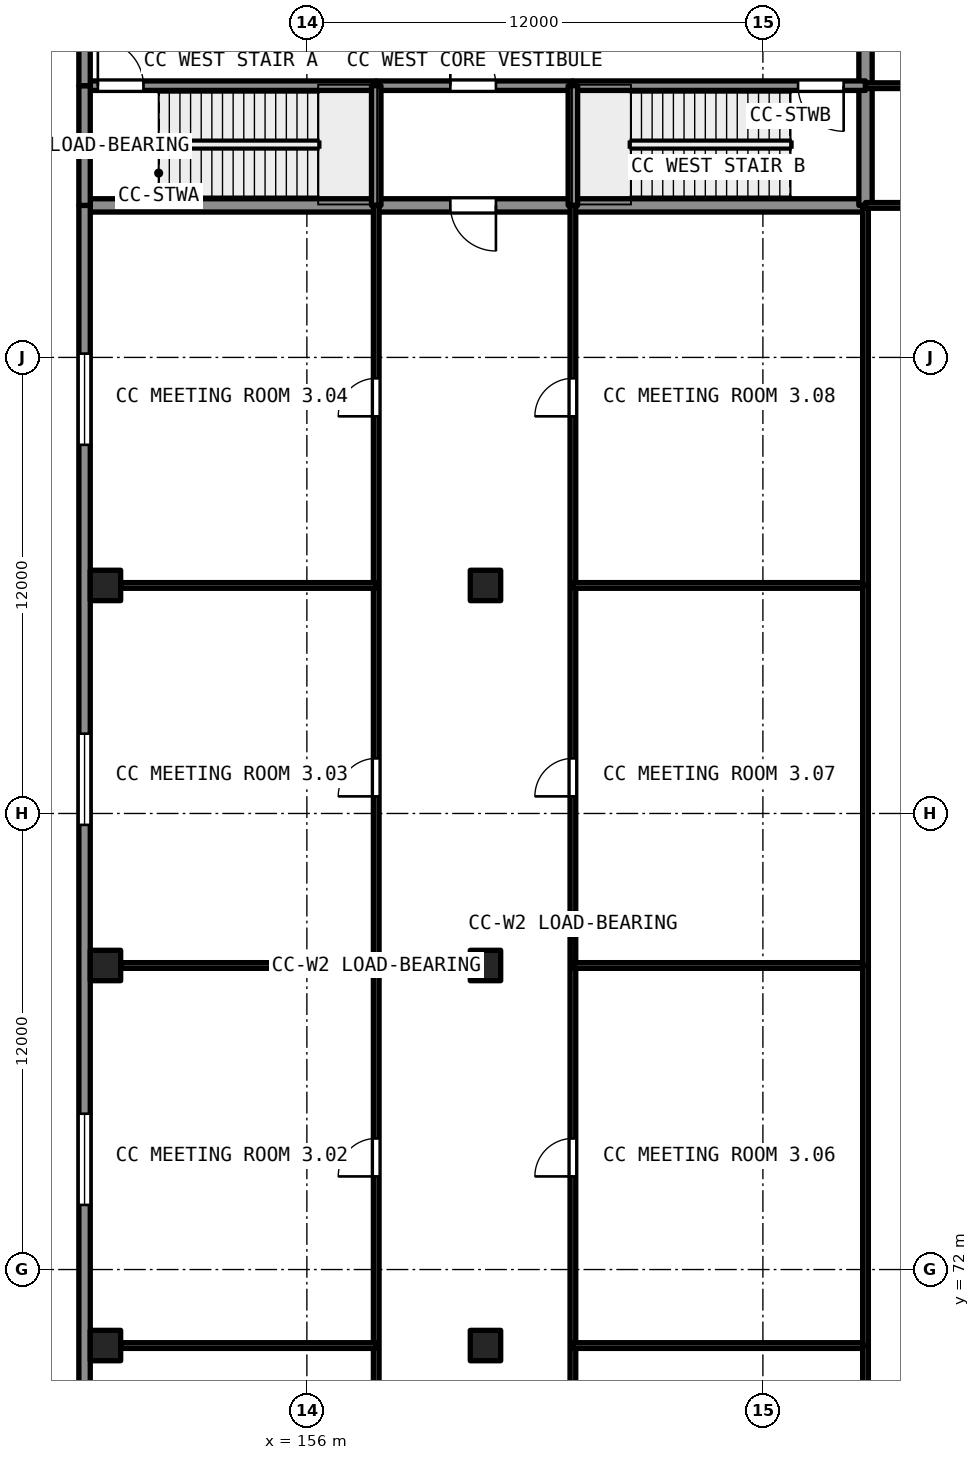
"""IFC4 building model, lengths in metres.
Left out: names, types, materials, properties, quantities, classifications, styles, units other than length and angle.
Written with IfcOpenShell. Run it as: python <this file> out.ifc"""

import sys

from ifc_helpers import new_model, si_unit, direction, frame, frame_2d, origin, origin_2d, place, context, subcontext, project, spatial, rectangle, extrude, element, fill, save


model = new_model("IFC4")
c1 = context("Model", 3, precision=1e-05, world=origin(), true_north=direction((0.0, 1.0)))
c2 = subcontext(c1, "Body", "Model", "MODEL_VIEW")
j1 = project(units=[si_unit("LENGTHUNIT", "METRE"), si_unit("PLANEANGLEUNIT", "RADIAN")], contexts=[c1])
p1 = place(None, origin())
s1 = spatial("IfcSite", under=j1, at=p1, CompositionType="ELEMENT")
p2 = place(p1, origin())
s2 = spatial("IfcBuilding", under=s1, at=p2, CompositionType="ELEMENT")
p3 = place(p2, frame((0.0, 0.0, 20.4)))
s3 = spatial("IfcBuildingStorey", under=s2, at=p3, CompositionType="ELEMENT", Elevation=20.4)
for number, where, z_axis, x_axis in (
    (1, (150.7, 70.0, 0.0), (0.0, 0.0, 1.0), (1.0, 0.0, 0.0)),
    (2, (150.7, 80.0, 0.0), (0.0, 0.0, 1.0), (1.0, 0.0, 0.0)),
    (3, (150.7, 90.0, 0.0), (0.0, 0.0, 1.0), (1.0, 0.0, 0.0)),
    (4, (160.7, 70.0, 0.0), (0.0, 0.0, 1.0), (1.0, 0.0, 0.0)),
    (5, (160.7, 80.0, 0.0), (0.0, 0.0, 1.0), (1.0, 0.0, 0.0)),
    (6, (160.7, 90.0, 0.0), (0.0, 0.0, 1.0), (1.0, 0.0, 0.0)),
):
    element("IfcColumn", number, at=place(p3, frame(where, z_axis=z_axis, x_axis=x_axis)), inside=s3, PredefinedType="COLUMN", context=c2, shape_type="SweptSolid", body=[
        extrude(rectangle(XDim=0.8, YDim=0.8, at=origin_2d()), origin(), (0.0, 0.0, 1.0), 4.59),
    ])
p4 = place(p3, frame((150.3, 100.0, 0.0), z_axis=(0.0, 0.0, 1.0), x_axis=(1.0, 0.0, 0.0)))
e7 = element("IfcWall", 7, at=p4, inside=s3, PredefinedType="SHEAR", context=c2, shape_type="SweptSolid", body=[
    extrude(rectangle(XDim=7.525, YDim=0.35, at=frame_2d((3.762, 0.0))), origin(), (0.0, 0.0, 1.0), 4.59),
])
p5 = place(p3, frame((163.0, 100.0, 0.0), z_axis=(0.0, 0.0, 1.0), x_axis=(-1.0, 0.0, 0.0)))
e8 = element("IfcWall", 8, at=p5, inside=s3, PredefinedType="SHEAR", context=c2, shape_type="SweptSolid", body=[
    extrude(rectangle(XDim=5.175, YDim=0.35, at=frame_2d((2.587, 0.0))), origin(), (0.0, 0.0, 1.0), 4.59),
])
p6 = place(p5, frame((2.025, 0.0, 0.0)))
e9 = element("IfcOpeningElement", 9, at=p6, cuts=e8, PredefinedType="OPENING", context=c2, shape_type="SweptSolid", body=[
    extrude(rectangle(XDim=1.2, YDim=2.1, at=frame_2d((0.6, 1.05))), frame((0.0, 0.186, 0.0), z_axis=(0.0, -1.0, 0.0), x_axis=(1.0, 0.0, 0.0)), (0.0, 0.0, 1.0), 0.371),
])
p7 = place(p3, frame((163.0, 100.0, 0.0), z_axis=(0.0, 0.0, 1.0), x_axis=(1.0, 0.0, 0.0)))
e10 = element("IfcWall", 10, at=p7, inside=s3, PredefinedType="SHEAR", context=c2, shape_type="SweptSolid", body=[
    extrude(rectangle(XDim=7.7, YDim=0.35, at=frame_2d((3.85, 0.0))), origin(), (0.0, 0.0, 1.0), 4.59),
])
p8 = place(p3, frame((170.7, 100.0, 0.0), z_axis=(0.0, 0.0, 1.0), x_axis=(0.0, 1.0, 0.0)))
e11 = element("IfcWall", 11, at=p8, inside=s3, PredefinedType="SHEAR", context=c2, shape_type="SweptSolid", body=[
    extrude(rectangle(XDim=3.15, YDim=0.35, at=frame_2d((1.575, 0.0))), origin(), (0.0, 0.0, 1.0), 4.59),
])
p9 = place(p3, frame((170.7, 103.15, 0.0), z_axis=(0.0, 0.0, 1.0), x_axis=(0.0, 1.0, 0.0)))
e12 = element("IfcWall", 12, at=p9, inside=s3, PredefinedType="SHEAR", context=c2, shape_type="SweptSolid", body=[
    extrude(rectangle(XDim=7.25, YDim=0.35, at=frame_2d((3.625, 0.0))), origin(), (0.0, 0.0, 1.0), 4.59),
])
p10 = place(p9, frame((1.2, 0.0, 0.0)))
e13 = element("IfcOpeningElement", 13, at=p10, cuts=e12, PredefinedType="OPENING", context=c2, shape_type="SweptSolid", body=[
    extrude(rectangle(XDim=1.8, YDim=2.1, at=frame_2d((0.9, 1.05))), frame((0.0, 0.186, 0.0), z_axis=(0.0, -1.0, 0.0), x_axis=(1.0, 0.0, 0.0)), (0.0, 0.0, 1.0), 0.371),
])
p11 = place(p3, frame((150.3, 103.15, 0.0), z_axis=(0.0, 0.0, 1.0), x_axis=(1.0, 0.0, 0.0)))
e14 = element("IfcWall", 14, at=p11, inside=s3, PredefinedType="SHEAR", context=c2, shape_type="SweptSolid", body=[
    extrude(rectangle(XDim=7.525, YDim=0.25, at=frame_2d((3.762, 0.0))), origin(), (0.0, 0.0, 1.0), 4.59),
])
p12 = place(p11, frame((0.2, 0.0, 0.0)))
e15 = element("IfcOpeningElement", 15, at=p12, cuts=e14, PredefinedType="OPENING", context=c2, shape_type="SweptSolid", body=[
    extrude(rectangle(XDim=1.2, YDim=2.1, at=frame_2d((0.6, 1.05))), frame((0.0, 0.135, 0.0), z_axis=(0.0, -1.0, 0.0), x_axis=(1.0, 0.0, 0.0)), (0.0, 0.0, 1.0), 0.271),
])
p13 = place(p3, frame((157.825, 103.15, 0.0), z_axis=(0.0, 0.0, 1.0), x_axis=(1.0, 0.0, 0.0)))
e16 = element("IfcWall", 16, at=p13, inside=s3, PredefinedType="SHEAR", context=c2, shape_type="SweptSolid", body=[
    extrude(rectangle(XDim=5.175, YDim=0.25, at=frame_2d((2.587, 0.0))), origin(), (0.0, 0.0, 1.0), 4.59),
])
p14 = place(p13, frame((1.95, 0.0, 0.0)))
e17 = element("IfcOpeningElement", 17, at=p14, cuts=e16, PredefinedType="OPENING", context=c2, shape_type="SweptSolid", body=[
    extrude(rectangle(XDim=1.2, YDim=2.1, at=frame_2d((0.6, 1.05))), frame((0.0, 0.135, 0.0), z_axis=(0.0, -1.0, 0.0), x_axis=(1.0, 0.0, 0.0)), (0.0, 0.0, 1.0), 0.271),
])
p15 = place(p3, frame((163.0, 103.15, 0.0), z_axis=(0.0, 0.0, 1.0), x_axis=(1.0, 0.0, 0.0)))
e18 = element("IfcWall", 18, at=p15, inside=s3, PredefinedType="SHEAR", context=c2, shape_type="SweptSolid", body=[
    extrude(rectangle(XDim=7.7, YDim=0.25, at=frame_2d((3.85, 0.0))), origin(), (0.0, 0.0, 1.0), 4.59),
])
p16 = place(p15, frame((5.925, 0.0, 0.0)))
e19 = element("IfcOpeningElement", 19, at=p16, cuts=e18, PredefinedType="OPENING", context=c2, shape_type="SweptSolid", body=[
    extrude(rectangle(XDim=1.2, YDim=2.1, at=frame_2d((0.6, 1.05))), frame((0.0, 0.135, 0.0), z_axis=(0.0, -1.0, 0.0), x_axis=(1.0, 0.0, 0.0)), (0.0, 0.0, 1.0), 0.271),
])
for number, where, z_axis, x_axis in (
    (20, (157.825, 100.0, 0.0), (0.0, 0.0, 1.0), (0.0, 1.0, 0.0)),
    (21, (163.0, 100.0, 0.0), (0.0, 0.0, 1.0), (0.0, 1.0, 0.0)),
):
    element("IfcWall", number, at=place(p3, frame(where, z_axis=z_axis, x_axis=x_axis)), inside=s3, PredefinedType="SHEAR", context=c2, shape_type="SweptSolid", body=[
        extrude(rectangle(XDim=3.15, YDim=0.25, at=frame_2d((1.575, 0.0))), origin(), (0.0, 0.0, 1.0), 4.59),
    ])
p17 = place(p3, frame((150.15, 49.45, 0.0), z_axis=(0.0, 0.0, 1.0), x_axis=(0.0, 1.0, 0.0)))
e22 = element("IfcWall", 22, at=p17, inside=s3, PredefinedType="SOLIDWALL", context=c2, shape_type="SweptSolid", body=[
    extrude(rectangle(XDim=50.55, YDim=0.3, at=frame_2d((25.275, 0.0))), origin(), (0.0, 0.0, 1.0), 4.59),
])
p18 = place(p17, frame((14.25, 0.0, 0.9)))
e23 = element("IfcOpeningElement", 23, at=p18, cuts=e22, PredefinedType="OPENING", context=c2, shape_type="SweptSolid", body=[
    extrude(rectangle(XDim=2.4, YDim=1.8, at=frame_2d((1.2, 0.9))), frame((0.0, 0.161, 0.0), z_axis=(0.0, -1.0, 0.0), x_axis=(1.0, 0.0, 0.0)), (0.0, 0.0, 1.0), 0.321),
])
p19 = place(p17, frame((24.25, 0.0, 0.9)))
e24 = element("IfcOpeningElement", 24, at=p19, cuts=e22, PredefinedType="OPENING", context=c2, shape_type="SweptSolid", body=[
    extrude(rectangle(XDim=2.4, YDim=1.8, at=frame_2d((1.2, 0.9))), frame((0.0, 0.161, 0.0), z_axis=(0.0, -1.0, 0.0), x_axis=(1.0, 0.0, 0.0)), (0.0, 0.0, 1.0), 0.321),
])
p20 = place(p17, frame((34.25, 0.0, 0.9)))
e25 = element("IfcOpeningElement", 25, at=p20, cuts=e22, PredefinedType="OPENING", context=c2, shape_type="SweptSolid", body=[
    extrude(rectangle(XDim=2.4, YDim=1.8, at=frame_2d((1.2, 0.9))), frame((0.0, 0.161, 0.0), z_axis=(0.0, -1.0, 0.0), x_axis=(1.0, 0.0, 0.0)), (0.0, 0.0, 1.0), 0.321),
])
p21 = place(p17, frame((44.25, 0.0, 0.9)))
e26 = element("IfcOpeningElement", 26, at=p21, cuts=e22, PredefinedType="OPENING", context=c2, shape_type="SweptSolid", body=[
    extrude(rectangle(XDim=2.4, YDim=1.8, at=frame_2d((1.2, 0.9))), frame((0.0, 0.161, 0.0), z_axis=(0.0, -1.0, 0.0), x_axis=(1.0, 0.0, 0.0)), (0.0, 0.0, 1.0), 0.321),
])
p22 = place(p3, frame((150.15, 100.0, 0.0), z_axis=(0.0, 0.0, 1.0), x_axis=(0.0, 1.0, 0.0)))
e27 = element("IfcWall", 27, at=p22, inside=s3, PredefinedType="SOLIDWALL", context=c2, shape_type="SweptSolid", body=[
    extrude(rectangle(XDim=3.15, YDim=0.3, at=frame_2d((1.575, 0.0))), origin(), (0.0, 0.0, 1.0), 4.59),
])
p23 = place(p3, frame((150.15, 103.15, 0.0), z_axis=(0.0, 0.0, 1.0), x_axis=(0.0, 1.0, 0.0)))
e28 = element("IfcWall", 28, at=p23, inside=s3, PredefinedType="SOLIDWALL", context=c2, shape_type="SweptSolid", body=[
    extrude(rectangle(XDim=4.225, YDim=0.3, at=frame_2d((2.113, 0.0))), origin(), (0.0, 0.0, 1.0), 4.59),
])
p24 = place(p3, frame((157.825, 100.0, 0.0), z_axis=(0.0, 0.0, 1.0), x_axis=(0.0, -1.0, 0.0)))
e29 = element("IfcWall", 29, at=p24, inside=s3, PredefinedType="PARTITIONING", context=c2, shape_type="SweptSolid", body=[
    extrude(rectangle(XDim=40.0, YDim=0.15, at=frame_2d((20.0, 0.0))), origin(), (0.0, 0.0, 1.0), 4.59),
])
p25 = place(p24, frame((34.55, 0.0, 0.0)))
e30 = element("IfcOpeningElement", 30, at=p25, cuts=e29, PredefinedType="OPENING", context=c2, shape_type="SweptSolid", body=[
    extrude(rectangle(XDim=1.0, YDim=2.1, at=frame_2d((0.5, 1.05))), frame((0.0, 0.085, 0.0), z_axis=(0.0, -1.0, 0.0), x_axis=(1.0, 0.0, 0.0)), (0.0, 0.0, 1.0), 0.171),
])
p26 = place(p24, frame((24.55, 0.0, 0.0)))
e31 = element("IfcOpeningElement", 31, at=p26, cuts=e29, PredefinedType="OPENING", context=c2, shape_type="SweptSolid", body=[
    extrude(rectangle(XDim=1.0, YDim=2.1, at=frame_2d((0.5, 1.05))), frame((0.0, 0.085, 0.0), z_axis=(0.0, -1.0, 0.0), x_axis=(1.0, 0.0, 0.0)), (0.0, 0.0, 1.0), 0.171),
])
p27 = place(p24, frame((14.55, 0.0, 0.0)))
e32 = element("IfcOpeningElement", 32, at=p27, cuts=e29, PredefinedType="OPENING", context=c2, shape_type="SweptSolid", body=[
    extrude(rectangle(XDim=1.0, YDim=2.1, at=frame_2d((0.5, 1.05))), frame((0.0, 0.085, 0.0), z_axis=(0.0, -1.0, 0.0), x_axis=(1.0, 0.0, 0.0)), (0.0, 0.0, 1.0), 0.171),
])
p28 = place(p24, frame((4.55, 0.0, 0.0)))
e33 = element("IfcOpeningElement", 33, at=p28, cuts=e29, PredefinedType="OPENING", context=c2, shape_type="SweptSolid", body=[
    extrude(rectangle(XDim=1.0, YDim=2.1, at=frame_2d((0.5, 1.05))), frame((0.0, 0.085, 0.0), z_axis=(0.0, -1.0, 0.0), x_axis=(1.0, 0.0, 0.0)), (0.0, 0.0, 1.0), 0.171),
])
p29 = place(p3, frame((163.0, 60.0, 0.0), z_axis=(0.0, 0.0, 1.0), x_axis=(0.0, 1.0, 0.0)))
e34 = element("IfcWall", 34, at=p29, inside=s3, PredefinedType="PARTITIONING", context=c2, shape_type="SweptSolid", body=[
    extrude(rectangle(XDim=40.0, YDim=0.15, at=frame_2d((20.0, 0.0))), origin(), (0.0, 0.0, 1.0), 4.59),
])
p30 = place(p29, frame((4.45, 0.0, 0.0)))
e35 = element("IfcOpeningElement", 35, at=p30, cuts=e34, PredefinedType="OPENING", context=c2, shape_type="SweptSolid", body=[
    extrude(rectangle(XDim=1.0, YDim=2.1, at=frame_2d((0.5, 1.05))), frame((0.0, 0.085, 0.0), z_axis=(0.0, -1.0, 0.0), x_axis=(1.0, 0.0, 0.0)), (0.0, 0.0, 1.0), 0.171),
])
p31 = place(p29, frame((14.45, 0.0, 0.0)))
e36 = element("IfcOpeningElement", 36, at=p31, cuts=e34, PredefinedType="OPENING", context=c2, shape_type="SweptSolid", body=[
    extrude(rectangle(XDim=1.0, YDim=2.1, at=frame_2d((0.5, 1.05))), frame((0.0, 0.085, 0.0), z_axis=(0.0, -1.0, 0.0), x_axis=(1.0, 0.0, 0.0)), (0.0, 0.0, 1.0), 0.171),
])
p32 = place(p29, frame((24.45, 0.0, 0.0)))
e37 = element("IfcOpeningElement", 37, at=p32, cuts=e34, PredefinedType="OPENING", context=c2, shape_type="SweptSolid", body=[
    extrude(rectangle(XDim=1.0, YDim=2.1, at=frame_2d((0.5, 1.05))), frame((0.0, 0.085, 0.0), z_axis=(0.0, -1.0, 0.0), x_axis=(1.0, 0.0, 0.0)), (0.0, 0.0, 1.0), 0.171),
])
p33 = place(p29, frame((34.45, 0.0, 0.0)))
e38 = element("IfcOpeningElement", 38, at=p33, cuts=e34, PredefinedType="OPENING", context=c2, shape_type="SweptSolid", body=[
    extrude(rectangle(XDim=1.0, YDim=2.1, at=frame_2d((0.5, 1.05))), frame((0.0, 0.085, 0.0), z_axis=(0.0, -1.0, 0.0), x_axis=(1.0, 0.0, 0.0)), (0.0, 0.0, 1.0), 0.171),
])
p34 = place(p3, frame((151.1, 70.0, 0.0), z_axis=(0.0, 0.0, 1.0), x_axis=(1.0, 0.0, 0.0)))
e39 = element("IfcWall", 39, at=p34, inside=s3, PredefinedType="PARTITIONING", context=c2, shape_type="SweptSolid", body=[
    extrude(rectangle(XDim=6.725, YDim=0.15, at=frame_2d((3.362, 0.0))), origin(), (0.0, 0.0, 1.0), 4.59),
])
p35 = place(p3, frame((163.0, 70.0, 0.0), z_axis=(0.0, 0.0, 1.0), x_axis=(1.0, 0.0, 0.0)))
e40 = element("IfcWall", 40, at=p35, inside=s3, PredefinedType="PARTITIONING", context=c2, shape_type="SweptSolid", body=[
    extrude(rectangle(XDim=7.7, YDim=0.15, at=frame_2d((3.85, 0.0))), origin(), (0.0, 0.0, 1.0), 4.59),
])
p36 = place(p3, frame((170.7, 60.4, 0.0), z_axis=(0.0, 0.0, 1.0), x_axis=(0.0, 1.0, 0.0)))
e41 = element("IfcWall", 41, at=p36, inside=s3, PredefinedType="PARTITIONING", context=c2, shape_type="SweptSolid", body=[
    extrude(rectangle(XDim=9.6, YDim=0.15, at=frame_2d((4.8, 0.0))), origin(), (0.0, 0.0, 1.0), 4.59),
])
p37 = place(p3, frame((151.1, 80.0, 0.0), z_axis=(0.0, 0.0, 1.0), x_axis=(1.0, 0.0, 0.0)))
e42 = element("IfcWall", 42, at=p37, inside=s3, PredefinedType="PARTITIONING", context=c2, shape_type="SweptSolid", body=[
    extrude(rectangle(XDim=6.725, YDim=0.15, at=frame_2d((3.362, 0.0))), origin(), (0.0, 0.0, 1.0), 4.59),
])
p38 = place(p3, frame((163.0, 80.0, 0.0), z_axis=(0.0, 0.0, 1.0), x_axis=(1.0, 0.0, 0.0)))
e43 = element("IfcWall", 43, at=p38, inside=s3, PredefinedType="PARTITIONING", context=c2, shape_type="SweptSolid", body=[
    extrude(rectangle(XDim=7.7, YDim=0.15, at=frame_2d((3.85, 0.0))), origin(), (0.0, 0.0, 1.0), 4.59),
])
p39 = place(p3, frame((170.7, 70.0, 0.0), z_axis=(0.0, 0.0, 1.0), x_axis=(0.0, 1.0, 0.0)))
e44 = element("IfcWall", 44, at=p39, inside=s3, PredefinedType="PARTITIONING", context=c2, shape_type="SweptSolid", body=[
    extrude(rectangle(XDim=10.0, YDim=0.15, at=frame_2d((5.0, 0.0))), origin(), (0.0, 0.0, 1.0), 4.59),
])
p40 = place(p3, frame((151.1, 90.0, 0.0), z_axis=(0.0, 0.0, 1.0), x_axis=(1.0, 0.0, 0.0)))
e45 = element("IfcWall", 45, at=p40, inside=s3, PredefinedType="PARTITIONING", context=c2, shape_type="SweptSolid", body=[
    extrude(rectangle(XDim=6.725, YDim=0.15, at=frame_2d((3.362, 0.0))), origin(), (0.0, 0.0, 1.0), 4.59),
])
p41 = place(p3, frame((163.0, 90.0, 0.0), z_axis=(0.0, 0.0, 1.0), x_axis=(1.0, 0.0, 0.0)))
e46 = element("IfcWall", 46, at=p41, inside=s3, PredefinedType="PARTITIONING", context=c2, shape_type="SweptSolid", body=[
    extrude(rectangle(XDim=7.7, YDim=0.15, at=frame_2d((3.85, 0.0))), origin(), (0.0, 0.0, 1.0), 4.59),
])
for number, where, z_axis, x_axis in (
    (47, (170.7, 80.0, 0.0), (0.0, 0.0, 1.0), (0.0, 1.0, 0.0)),
    (48, (170.7, 90.0, 0.0), (0.0, 0.0, 1.0), (0.0, 1.0, 0.0)),
):
    element("IfcWall", number, at=place(p3, frame(where, z_axis=z_axis, x_axis=x_axis)), inside=s3, PredefinedType="PARTITIONING", context=c2, shape_type="SweptSolid", body=[
        extrude(rectangle(XDim=10.0, YDim=0.15, at=frame_2d((5.0, 0.0))), origin(), (0.0, 0.0, 1.0), 4.59),
    ])
p42 = place(p3, frame((170.7, 100.0, 0.0), z_axis=(0.0, 0.0, 1.0), x_axis=(1.0, 0.0, 0.0)))
e49 = element("IfcWall", 49, at=p42, inside=s3, PredefinedType="PARTITIONING", context=c2, shape_type="SweptSolid", body=[
    extrude(rectangle(XDim=9.6, YDim=0.15, at=frame_2d((4.8, 0.0))), origin(), (0.0, 0.0, 1.0), 4.59),
])
p43 = place(p3, frame((170.7, 103.15, 0.0), z_axis=(0.0, 0.0, 1.0), x_axis=(1.0, 0.0, 0.0)))
e50 = element("IfcWall", 50, at=p43, inside=s3, PredefinedType="PARTITIONING", context=c2, shape_type="SweptSolid", body=[
    extrude(rectangle(XDim=10.85, YDim=0.15, at=frame_2d((5.425, 0.0))), origin(), (0.0, 0.0, 1.0), 4.59),
])
p44 = place(p43, frame((4.95, 0.0, 0.0)))
e51 = element("IfcOpeningElement", 51, at=p44, cuts=e50, PredefinedType="OPENING", context=c2, shape_type="SweptSolid", body=[
    extrude(rectangle(XDim=1.0, YDim=2.1, at=frame_2d((0.5, 1.05))), frame((0.0, 0.085, 0.0), z_axis=(0.0, -1.0, 0.0), x_axis=(1.0, 0.0, 0.0)), (0.0, 0.0, 1.0), 0.171),
])
p45 = place(p6, origin())
e52 = element("IfcDoor", 52, at=p45, inside=s3, OperationType="SINGLE_SWING_LEFT", PredefinedType="DOOR", context=c2, shape_type="SweptSolid", body=[
    extrude(rectangle(XDim=1.2, YDim=2.1, at=frame_2d((0.6, 1.05))), frame((0.0, 0.025, 0.0), z_axis=(0.0, -1.0, 0.0), x_axis=(1.0, 0.0, 0.0)), (0.0, 0.0, 1.0), 0.05),
])
fill(e9, e52)
p46 = place(p26, origin())
e53 = element("IfcDoor", 53, at=p46, inside=s3, OperationType="SINGLE_SWING_RIGHT", PredefinedType="DOOR", context=c2, shape_type="SweptSolid", body=[
    extrude(rectangle(XDim=1.0, YDim=2.1, at=frame_2d((0.5, 1.05))), frame((0.0, 0.025, 0.0), z_axis=(0.0, -1.0, 0.0), x_axis=(1.0, 0.0, 0.0)), (0.0, 0.0, 1.0), 0.05),
])
fill(e31, e53)
p47 = place(p31, origin())
e54 = element("IfcDoor", 54, at=p47, inside=s3, OperationType="SINGLE_SWING_LEFT", PredefinedType="DOOR", context=c2, shape_type="SweptSolid", body=[
    extrude(rectangle(XDim=1.0, YDim=2.1, at=frame_2d((0.5, 1.05))), frame((0.0, 0.025, 0.0), z_axis=(0.0, -1.0, 0.0), x_axis=(1.0, 0.0, 0.0)), (0.0, 0.0, 1.0), 0.05),
])
fill(e36, e54)
p48 = place(p27, origin())
e55 = element("IfcDoor", 55, at=p48, inside=s3, OperationType="SINGLE_SWING_RIGHT", PredefinedType="DOOR", context=c2, shape_type="SweptSolid", body=[
    extrude(rectangle(XDim=1.0, YDim=2.1, at=frame_2d((0.5, 1.05))), frame((0.0, 0.025, 0.0), z_axis=(0.0, -1.0, 0.0), x_axis=(1.0, 0.0, 0.0)), (0.0, 0.0, 1.0), 0.05),
])
fill(e32, e55)
p49 = place(p32, origin())
e56 = element("IfcDoor", 56, at=p49, inside=s3, OperationType="SINGLE_SWING_LEFT", PredefinedType="DOOR", context=c2, shape_type="SweptSolid", body=[
    extrude(rectangle(XDim=1.0, YDim=2.1, at=frame_2d((0.5, 1.05))), frame((0.0, 0.025, 0.0), z_axis=(0.0, -1.0, 0.0), x_axis=(1.0, 0.0, 0.0)), (0.0, 0.0, 1.0), 0.05),
])
fill(e37, e56)
p50 = place(p28, origin())
e57 = element("IfcDoor", 57, at=p50, inside=s3, OperationType="SINGLE_SWING_RIGHT", PredefinedType="DOOR", context=c2, shape_type="SweptSolid", body=[
    extrude(rectangle(XDim=1.0, YDim=2.1, at=frame_2d((0.5, 1.05))), frame((0.0, 0.025, 0.0), z_axis=(0.0, -1.0, 0.0), x_axis=(1.0, 0.0, 0.0)), (0.0, 0.0, 1.0), 0.05),
])
fill(e33, e57)
p51 = place(p33, origin())
e58 = element("IfcDoor", 58, at=p51, inside=s3, OperationType="SINGLE_SWING_LEFT", PredefinedType="DOOR", context=c2, shape_type="SweptSolid", body=[
    extrude(rectangle(XDim=1.0, YDim=2.1, at=frame_2d((0.5, 1.05))), frame((0.0, 0.025, 0.0), z_axis=(0.0, -1.0, 0.0), x_axis=(1.0, 0.0, 0.0)), (0.0, 0.0, 1.0), 0.05),
])
fill(e38, e58)
p52 = place(p12, origin())
e59 = element("IfcDoor", 59, at=p52, inside=s3, OperationType="SINGLE_SWING_LEFT", PredefinedType="DOOR", context=c2, shape_type="SweptSolid", body=[
    extrude(rectangle(XDim=1.2, YDim=2.1, at=frame_2d((0.6, 1.05))), frame((0.0, 0.025, 0.0), z_axis=(0.0, -1.0, 0.0), x_axis=(1.0, 0.0, 0.0)), (0.0, 0.0, 1.0), 0.05),
])
fill(e15, e59)
p53 = place(p16, origin())
e60 = element("IfcDoor", 60, at=p53, inside=s3, OperationType="SINGLE_SWING_RIGHT", PredefinedType="DOOR", context=c2, shape_type="SweptSolid", body=[
    extrude(rectangle(XDim=1.2, YDim=2.1, at=frame_2d((0.6, 1.05))), frame((0.0, 0.025, 0.0), z_axis=(0.0, -1.0, 0.0), x_axis=(1.0, 0.0, 0.0)), (0.0, 0.0, 1.0), 0.05),
])
fill(e19, e60)
p54 = place(p14, origin())
e61 = element("IfcDoor", 61, at=p54, inside=s3, OperationType="SINGLE_SWING_LEFT", PredefinedType="DOOR", context=c2, shape_type="SweptSolid", body=[
    extrude(rectangle(XDim=1.2, YDim=2.1, at=frame_2d((0.6, 1.05))), frame((0.0, 0.025, 0.0), z_axis=(0.0, -1.0, 0.0), x_axis=(1.0, 0.0, 0.0)), (0.0, 0.0, 1.0), 0.05),
])
fill(e17, e61)
p55 = place(p19, origin())
e62 = element("IfcWindow", 62, at=p55, inside=s3, PartitioningType="DOUBLE_PANEL_VERTICAL", PredefinedType="WINDOW", context=c2, shape_type="SweptSolid", body=[
    extrude(rectangle(XDim=2.4, YDim=1.8, at=frame_2d((1.2, 0.9))), frame((0.0, 0.03, 0.0), z_axis=(0.0, -1.0, 0.0), x_axis=(1.0, 0.0, 0.0)), (0.0, 0.0, 1.0), 0.06),
])
fill(e24, e62)
p56 = place(p20, origin())
e63 = element("IfcWindow", 63, at=p56, inside=s3, PartitioningType="DOUBLE_PANEL_VERTICAL", PredefinedType="WINDOW", context=c2, shape_type="SweptSolid", body=[
    extrude(rectangle(XDim=2.4, YDim=1.8, at=frame_2d((1.2, 0.9))), frame((0.0, 0.03, 0.0), z_axis=(0.0, -1.0, 0.0), x_axis=(1.0, 0.0, 0.0)), (0.0, 0.0, 1.0), 0.06),
])
fill(e25, e63)
p57 = place(p21, origin())
e64 = element("IfcWindow", 64, at=p57, inside=s3, PartitioningType="DOUBLE_PANEL_VERTICAL", PredefinedType="WINDOW", context=c2, shape_type="SweptSolid", body=[
    extrude(rectangle(XDim=2.4, YDim=1.8, at=frame_2d((1.2, 0.9))), frame((0.0, 0.03, 0.0), z_axis=(0.0, -1.0, 0.0), x_axis=(1.0, 0.0, 0.0)), (0.0, 0.0, 1.0), 0.06),
])
fill(e26, e64)
save(model, sys.argv[1])
